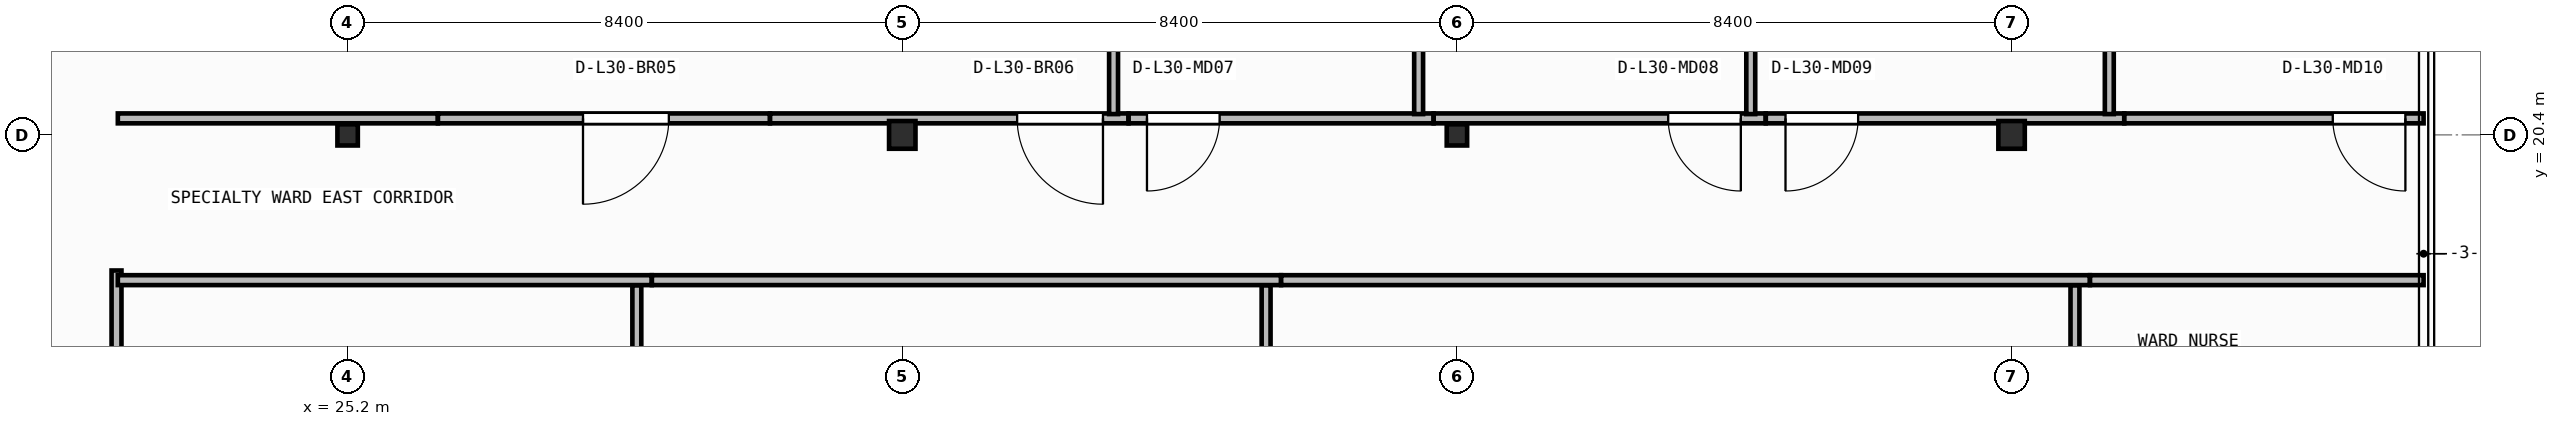
"""IFC4 building model, lengths in metres.
Left out: names, types, materials, properties, quantities, classifications, styles, units other than length and angle.
Written with IfcOpenShell. Run it as: python <this file> out.ifc"""

import sys

from ifc_helpers import new_model, si_unit, direction, frame, frame_2d, origin, origin_2d, place, context, subcontext, project, spatial, rectangle, i_section, extrude, element, fill, save


model = new_model("IFC4")
c1 = context("Model", 3, precision=1e-05, world=origin(), true_north=direction((0.0, 1.0)))
c2 = subcontext(c1, "Body", "Model", "MODEL_VIEW")
j1 = project(units=[si_unit("LENGTHUNIT", "METRE"), si_unit("PLANEANGLEUNIT", "RADIAN")], contexts=[c1])
p1 = place(None, origin())
s1 = spatial("IfcSite", under=j1, at=p1, CompositionType="ELEMENT")
p2 = place(p1, origin())
s2 = spatial("IfcBuilding", under=s1, at=p2, CompositionType="ELEMENT")
p3 = place(p2, frame((0.0, 0.0, 123.1)))
s3 = spatial("IfcBuildingStorey", under=s2, at=p3, CompositionType="ELEMENT", Elevation=123.1)
p4 = place(p3, frame((25.2, 20.4, 0.0), z_axis=(0.0, 0.0, 1.0), x_axis=(1.0, 0.0, 0.0)))
e1 = element("IfcColumn", 1, at=p4, inside=s3, PredefinedType="COLUMN", context=c2, shape_type="SweptSolid", body=[
    extrude(i_section(OverallWidth=0.309, OverallDepth=0.321, WebThickness=0.014, FlangeThickness=0.022, FilletRadius=0.017, at=origin_2d()), origin(), (0.0, 0.0, 1.0), 3.95),
])
p5 = place(p3, frame((33.6, 20.4, 0.0), z_axis=(0.0, 0.0, 1.0), x_axis=(1.0, 0.0, 0.0)))
e2 = element("IfcColumn", 2, at=p5, inside=s3, PredefinedType="COLUMN", context=c2, shape_type="SweptSolid", body=[
    extrude(i_section(OverallWidth=0.4, OverallDepth=0.42, WebThickness=0.025, FlangeThickness=0.04, at=origin_2d()), origin(), (0.0, 0.0, 1.0), 3.95),
])
p6 = place(p3, frame((42.0, 20.4, 0.0), z_axis=(0.0, 0.0, 1.0), x_axis=(1.0, 0.0, 0.0)))
e3 = element("IfcColumn", 3, at=p6, inside=s3, PredefinedType="COLUMN", context=c2, shape_type="SweptSolid", body=[
    extrude(i_section(OverallWidth=0.309, OverallDepth=0.321, WebThickness=0.014, FlangeThickness=0.022, FilletRadius=0.017, at=origin_2d()), origin(), (0.0, 0.0, 1.0), 3.95),
])
p7 = place(p3, frame((50.4, 20.4, 0.0), z_axis=(0.0, 0.0, 1.0), x_axis=(1.0, 0.0, 0.0)))
e4 = element("IfcColumn", 4, at=p7, inside=s3, PredefinedType="COLUMN", context=c2, shape_type="SweptSolid", body=[
    extrude(i_section(OverallWidth=0.4, OverallDepth=0.42, WebThickness=0.025, FlangeThickness=0.04, at=origin_2d()), origin(), (0.0, 0.0, 1.0), 3.95),
])
p8 = place(p3, frame((21.7, 14.7, 0.0), z_axis=(0.0, 0.0, 1.0), x_axis=(0.0, 1.0, 0.0)))
e5 = element("IfcWall", 5, at=p8, inside=s3, PredefinedType="PARTITIONING", context=c2, shape_type="SweptSolid", body=[
    extrude(rectangle(XDim=3.646, YDim=0.15, at=frame_2d((1.823, 0.0))), origin(), (0.0, 0.0, 1.0), 3.71),
])
p9 = place(p3, frame((21.72, 18.2, 0.0), z_axis=(0.0, 0.0, 1.0), x_axis=(1.0, 0.0, 0.0)))
e6 = element("IfcWall", 6, at=p9, inside=s3, PredefinedType="PARTITIONING", context=c2, shape_type="SweptSolid", body=[
    extrude(rectangle(XDim=8.086, YDim=0.15, at=frame_2d((4.043, 0.0))), origin(), (0.0, 0.0, 1.0), 3.71),
])
p10 = place(p3, frame((29.808, 18.2, 0.0), z_axis=(0.0, 0.0, 1.0), x_axis=(1.0, 0.0, 0.0)))
e7 = element("IfcWall", 7, at=p10, inside=s3, PredefinedType="PARTITIONING", context=c2, shape_type="SweptSolid", body=[
    extrude(rectangle(XDim=9.528, YDim=0.15, at=frame_2d((4.764, 0.0))), origin(), (0.0, 0.0, 1.0), 3.71),
])
p11 = place(p3, frame((39.338, 18.2, 0.0), z_axis=(0.0, 0.0, 1.0), x_axis=(1.0, 0.0, 0.0)))
e8 = element("IfcWall", 8, at=p11, inside=s3, PredefinedType="PARTITIONING", context=c2, shape_type="SweptSolid", body=[
    extrude(rectangle(XDim=12.248, YDim=0.15, at=frame_2d((6.124, 0.0))), origin(), (0.0, 0.0, 1.0), 3.71),
])
p12 = place(p3, frame((51.588, 18.2, 0.0), z_axis=(0.0, 0.0, 1.0), x_axis=(1.0, 0.0, 0.0)))
e9 = element("IfcWall", 9, at=p12, inside=s3, PredefinedType="PARTITIONING", context=c2, shape_type="SweptSolid", body=[
    extrude(rectangle(XDim=5.052, YDim=0.15, at=frame_2d((2.526, 0.0))), origin(), (0.0, 0.0, 1.0), 3.71),
])
p13 = place(p3, frame((26.566, 20.65, 0.0), z_axis=(0.0, 0.0, 1.0), x_axis=(-1.0, 0.0, 0.0)))
e10 = element("IfcWall", 10, at=p13, inside=s3, PredefinedType="PARTITIONING", context=c2, shape_type="SweptSolid", body=[
    extrude(rectangle(XDim=4.846, YDim=0.15, at=frame_2d((2.423, 0.0))), origin(), (0.0, 0.0, 1.0), 3.083),
])
p14 = place(p3, frame((31.596, 20.65, 0.0), z_axis=(0.0, 0.0, 1.0), x_axis=(-1.0, 0.0, 0.0)))
e11 = element("IfcWall", 11, at=p14, inside=s3, PredefinedType="PARTITIONING", context=c2, shape_type="SweptSolid", body=[
    extrude(rectangle(XDim=5.028, YDim=0.15, at=frame_2d((2.514, 0.0))), origin(), (0.0, 0.0, 1.0), 3.083),
])
p15 = place(p14, frame((1.531, 0.0, 0.0)))
e12 = element("IfcOpeningElement", 12, at=p15, cuts=e11, PredefinedType="OPENING", context=c2, shape_type="SweptSolid", body=[
    extrude(rectangle(XDim=1.3, YDim=2.15, at=frame_2d((0.65, 1.075))), frame((0.0, 0.085, 0.0), z_axis=(0.0, -1.0, 0.0), x_axis=(1.0, 0.0, 0.0)), (0.0, 0.0, 1.0), 0.17),
])
p16 = place(p3, frame((37.026, 20.65, 0.0), z_axis=(0.0, 0.0, 1.0), x_axis=(-1.0, 0.0, 0.0)))
e13 = element("IfcWall", 13, at=p16, inside=s3, PredefinedType="PARTITIONING", context=c2, shape_type="SweptSolid", body=[
    extrude(rectangle(XDim=5.428, YDim=0.15, at=frame_2d((2.714, 0.0))), origin(), (0.0, 0.0, 1.0), 3.083),
])
p17 = place(p16, frame((0.386, 0.0, 0.0)))
e14 = element("IfcOpeningElement", 14, at=p17, cuts=e13, PredefinedType="OPENING", context=c2, shape_type="SweptSolid", body=[
    extrude(rectangle(XDim=1.3, YDim=2.15, at=frame_2d((0.65, 1.075))), frame((0.0, 0.085, 0.0), z_axis=(0.0, -1.0, 0.0), x_axis=(1.0, 0.0, 0.0)), (0.0, 0.0, 1.0), 0.17),
])
p18 = place(p3, frame((41.646, 20.65, 0.0), z_axis=(0.0, 0.0, 1.0), x_axis=(-1.0, 0.0, 0.0)))
e15 = element("IfcWall", 15, at=p18, inside=s3, PredefinedType="PARTITIONING", context=c2, shape_type="SweptSolid", body=[
    extrude(rectangle(XDim=4.618, YDim=0.15, at=frame_2d((2.309, 0.0))), origin(), (0.0, 0.0, 1.0), 3.083),
])
p19 = place(p18, frame((3.24, 0.0, 0.0)))
e16 = element("IfcOpeningElement", 16, at=p19, cuts=e15, PredefinedType="OPENING", context=c2, shape_type="SweptSolid", body=[
    extrude(rectangle(XDim=1.1, YDim=2.1, at=frame_2d((0.55, 1.05))), frame((0.0, 0.085, 0.0), z_axis=(0.0, -1.0, 0.0), x_axis=(1.0, 0.0, 0.0)), (0.0, 0.0, 1.0), 0.17),
])
p20 = place(p3, frame((46.676, 20.65, 0.0), z_axis=(0.0, 0.0, 1.0), x_axis=(-1.0, 0.0, 0.0)))
e17 = element("IfcWall", 17, at=p20, inside=s3, PredefinedType="PARTITIONING", context=c2, shape_type="SweptSolid", body=[
    extrude(rectangle(XDim=5.028, YDim=0.15, at=frame_2d((2.514, 0.0))), origin(), (0.0, 0.0, 1.0), 3.083),
])
p21 = place(p20, frame((0.376, 0.0, 0.0)))
e18 = element("IfcOpeningElement", 18, at=p21, cuts=e17, PredefinedType="OPENING", context=c2, shape_type="SweptSolid", body=[
    extrude(rectangle(XDim=1.1, YDim=2.1, at=frame_2d((0.55, 1.05))), frame((0.0, 0.085, 0.0), z_axis=(0.0, -1.0, 0.0), x_axis=(1.0, 0.0, 0.0)), (0.0, 0.0, 1.0), 0.17),
])
p22 = place(p3, frame((52.106, 20.65, 0.0), z_axis=(0.0, 0.0, 1.0), x_axis=(-1.0, 0.0, 0.0)))
e19 = element("IfcWall", 19, at=p22, inside=s3, PredefinedType="PARTITIONING", context=c2, shape_type="SweptSolid", body=[
    extrude(rectangle(XDim=5.428, YDim=0.15, at=frame_2d((2.714, 0.0))), origin(), (0.0, 0.0, 1.0), 3.083),
])
p23 = place(p22, frame((4.03, 0.0, 0.0)))
e20 = element("IfcOpeningElement", 20, at=p23, cuts=e19, PredefinedType="OPENING", context=c2, shape_type="SweptSolid", body=[
    extrude(rectangle(XDim=1.1, YDim=2.1, at=frame_2d((0.55, 1.05))), frame((0.0, 0.085, 0.0), z_axis=(0.0, -1.0, 0.0), x_axis=(1.0, 0.0, 0.0)), (0.0, 0.0, 1.0), 0.17),
])
p24 = place(p3, frame((56.64, 20.65, 0.0), z_axis=(0.0, 0.0, 1.0), x_axis=(-1.0, 0.0, 0.0)))
e21 = element("IfcWall", 21, at=p24, inside=s3, PredefinedType="PARTITIONING", context=c2, shape_type="SweptSolid", body=[
    extrude(rectangle(XDim=4.532, YDim=0.15, at=frame_2d((2.266, 0.0))), origin(), (0.0, 0.0, 1.0), 3.71),
])
p25 = place(p24, frame((0.276, 0.0, 0.0)))
e22 = element("IfcOpeningElement", 22, at=p25, cuts=e21, PredefinedType="OPENING", context=c2, shape_type="SweptSolid", body=[
    extrude(rectangle(XDim=1.1, YDim=2.1, at=frame_2d((0.55, 1.05))), frame((0.0, 0.085, 0.0), z_axis=(0.0, -1.0, 0.0), x_axis=(1.0, 0.0, 0.0)), (0.0, 0.0, 1.0), 0.17),
])
for number, where, z_axis, x_axis in (
    (23, (29.58, 14.76, 0.0), (0.0, 0.0, 1.0), (0.0, 1.0, 0.0)),
    (24, (39.11, 14.76, 0.0), (0.0, 0.0, 1.0), (0.0, 1.0, 0.0)),
    (25, (51.36, 14.76, 0.0), (0.0, 0.0, 1.0), (0.0, 1.0, 0.0)),
):
    element("IfcWall", number, at=place(p3, frame(where, z_axis=z_axis, x_axis=x_axis)), inside=s3, PredefinedType="PARTITIONING", context=c2, shape_type="SweptSolid", body=[
        extrude(rectangle(XDim=3.36, YDim=0.135, at=frame_2d((1.68, 0.0))), origin(), (0.0, 0.0, 1.0), 3.71),
    ])
for number, where, z_axis, x_axis in (
    (26, (36.8, 20.715, 0.0), (0.0, 0.0, 1.0), (0.0, 1.0, 0.0)),
    (27, (41.42, 20.715, 0.0), (0.0, 0.0, 1.0), (0.0, 1.0, 0.0)),
    (28, (46.45, 20.715, 0.0), (0.0, 0.0, 1.0), (0.0, 1.0, 0.0)),
    (29, (51.88, 20.715, 0.0), (0.0, 0.0, 1.0), (0.0, 1.0, 0.0)),
):
    element("IfcWall", number, at=place(p3, frame(where, z_axis=z_axis, x_axis=x_axis)), inside=s3, PredefinedType="PARTITIONING", context=c2, shape_type="SweptSolid", body=[
        extrude(rectangle(XDim=6.385, YDim=0.135, at=frame_2d((3.192, 0.0))), origin(), (0.0, 0.0, 1.0), 3.71),
    ])
p26 = place(p15, origin())
e30 = element("IfcDoor", 30, at=p26, inside=s3, OperationType="SINGLE_SWING_RIGHT", PredefinedType="DOOR", context=c2, shape_type="SweptSolid", body=[
    extrude(rectangle(XDim=1.3, YDim=2.15, at=frame_2d((0.65, 1.075))), frame((0.0, 0.025, 0.0), z_axis=(0.0, -1.0, 0.0), x_axis=(1.0, 0.0, 0.0)), (0.0, 0.0, 1.0), 0.05),
])
fill(e12, e30)
p27 = place(p17, origin())
e31 = element("IfcDoor", 31, at=p27, inside=s3, OperationType="SINGLE_SWING_LEFT", PredefinedType="DOOR", context=c2, shape_type="SweptSolid", body=[
    extrude(rectangle(XDim=1.3, YDim=2.15, at=frame_2d((0.65, 1.075))), frame((0.0, 0.025, 0.0), z_axis=(0.0, -1.0, 0.0), x_axis=(1.0, 0.0, 0.0)), (0.0, 0.0, 1.0), 0.05),
])
fill(e14, e31)
p28 = place(p19, origin())
e32 = element("IfcDoor", 32, at=p28, inside=s3, OperationType="SINGLE_SWING_RIGHT", PredefinedType="DOOR", context=c2, shape_type="SweptSolid", body=[
    extrude(rectangle(XDim=1.1, YDim=2.1, at=frame_2d((0.55, 1.05))), frame((0.0, 0.025, 0.0), z_axis=(0.0, -1.0, 0.0), x_axis=(1.0, 0.0, 0.0)), (0.0, 0.0, 1.0), 0.05),
])
fill(e16, e32)
p29 = place(p21, origin())
e33 = element("IfcDoor", 33, at=p29, inside=s3, OperationType="SINGLE_SWING_LEFT", PredefinedType="DOOR", context=c2, shape_type="SweptSolid", body=[
    extrude(rectangle(XDim=1.1, YDim=2.1, at=frame_2d((0.55, 1.05))), frame((0.0, 0.025, 0.0), z_axis=(0.0, -1.0, 0.0), x_axis=(1.0, 0.0, 0.0)), (0.0, 0.0, 1.0), 0.05),
])
fill(e18, e33)
p30 = place(p23, origin())
e34 = element("IfcDoor", 34, at=p30, inside=s3, OperationType="SINGLE_SWING_RIGHT", PredefinedType="DOOR", context=c2, shape_type="SweptSolid", body=[
    extrude(rectangle(XDim=1.1, YDim=2.1, at=frame_2d((0.55, 1.05))), frame((0.0, 0.025, 0.0), z_axis=(0.0, -1.0, 0.0), x_axis=(1.0, 0.0, 0.0)), (0.0, 0.0, 1.0), 0.05),
])
fill(e20, e34)
p31 = place(p25, origin())
e35 = element("IfcDoor", 35, at=p31, inside=s3, OperationType="SINGLE_SWING_LEFT", PredefinedType="DOOR", context=c2, shape_type="SweptSolid", body=[
    extrude(rectangle(XDim=1.1, YDim=2.1, at=frame_2d((0.55, 1.05))), frame((0.0, 0.025, 0.0), z_axis=(0.0, -1.0, 0.0), x_axis=(1.0, 0.0, 0.0)), (0.0, 0.0, 1.0), 0.05),
])
fill(e22, e35)
save(model, sys.argv[1])
